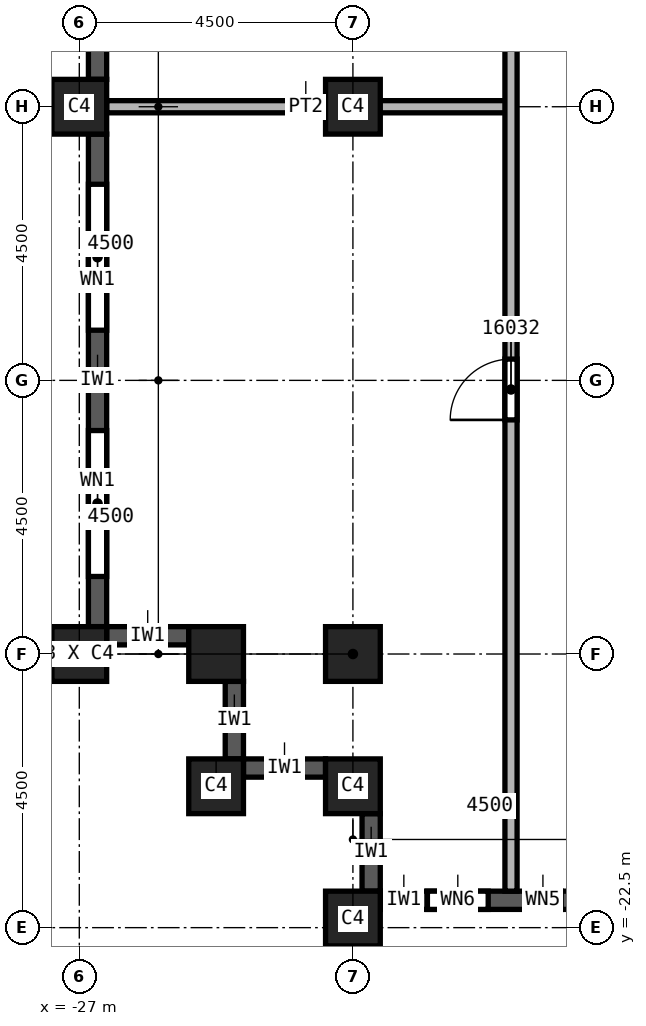
"""IFC4 building model, lengths in metres.
Left out: names, types, materials, properties, quantities, classifications, styles, units other than length and angle.
Written with IfcOpenShell. Run it as: python <this file> out.ifc"""

import sys

from ifc_helpers import new_model, si_unit, direction, frame, frame_2d, origin, origin_2d, place, context, subcontext, project, spatial, rectangle, extrude, element, fill, save


model = new_model("IFC4")
c1 = context("Model", 3, precision=1e-05, world=origin(), true_north=direction((0.0, 1.0)))
c2 = subcontext(c1, "Body", "Model", "MODEL_VIEW")
j1 = project(units=[si_unit("LENGTHUNIT", "METRE"), si_unit("PLANEANGLEUNIT", "RADIAN")], contexts=[c1])
p1 = place(None, origin())
s1 = spatial("IfcSite", under=j1, at=p1, CompositionType="ELEMENT")
p2 = place(p1, origin())
s2 = spatial("IfcBuilding", under=s1, at=p2, CompositionType="ELEMENT")
p3 = place(p2, frame((0.0, 0.0, 246.0)))
s3 = spatial("IfcBuildingStorey", under=s2, at=p3, CompositionType="ELEMENT", Elevation=246.0)
for number, where, z_axis, x_axis in (
    (1, (-22.5, -9.0, 0.0), (0.0, 0.0, 1.0), (1.0, 0.0, 0.0)),
    (2, (-22.5, -18.0, 0.0), (0.0, 0.0, 1.0), (1.0, 0.0, 0.0)),
    (3, (-22.5, -22.35, 0.0), (0.0, 0.0, 1.0), (1.0, 0.0, 0.0)),
    (4, (-27.0, -9.0, 0.0), (0.0, 0.0, 1.0), (0.0, 1.0, 0.0)),
    (5, (-27.0, -18.0, 0.0), (0.0, 0.0, 1.0), (0.0, 1.0, 0.0)),
    (6, (-22.5, -20.175, 0.0), (0.0, 0.0, 1.0), (1.0, 0.0, 0.0)),
    (7, (-24.75, -20.175, 0.0), (0.0, 0.0, 1.0), (1.0, 0.0, 0.0)),
    (8, (-24.75, -18.0, 0.0), (0.0, 0.0, 1.0), (1.0, 0.0, 0.0)),
):
    element("IfcColumn", number, at=place(p3, frame(where, z_axis=z_axis, x_axis=x_axis)), inside=s3, PredefinedType="COLUMN", context=c2, shape_type="SweptSolid", body=[
        extrude(rectangle(XDim=0.9, YDim=0.9, at=origin_2d()), origin(), (0.0, 0.0, 1.0), 3.72),
    ])
p4 = place(p3, frame((-26.7, -0.45, 0.0), z_axis=(0.0, 0.0, 1.0), x_axis=(0.0, -1.0, 0.0)))
e9 = element("IfcWall", 9, at=p4, inside=s3, PredefinedType="SOLIDWALL", context=c2, shape_type="SweptSolid", body=[
    extrude(rectangle(XDim=8.1, YDim=0.3, at=frame_2d((4.05, 0.0))), origin(), (0.0, 0.0, 1.0), 3.12),
])
p5 = place(p4, frame((0.825, 0.0, 0.8)))
e10 = element("IfcOpeningElement", 10, at=p5, cuts=e9, PredefinedType="OPENING", context=c2, shape_type="SweptSolid", body=[
    extrude(rectangle(XDim=2.4, YDim=1.95, at=frame_2d((1.2, 0.975))), frame((0.0, 0.15, 0.0), z_axis=(0.0, -1.0, 0.0), x_axis=(1.0, 0.0, 0.0)), (0.0, 0.0, 1.0), 0.3),
])
p6 = place(p4, frame((4.875, 0.0, 0.8)))
e11 = element("IfcOpeningElement", 11, at=p6, cuts=e9, PredefinedType="OPENING", context=c2, shape_type="SweptSolid", body=[
    extrude(rectangle(XDim=2.4, YDim=1.95, at=frame_2d((1.2, 0.975))), frame((0.0, 0.15, 0.0), z_axis=(0.0, -1.0, 0.0), x_axis=(1.0, 0.0, 0.0)), (0.0, 0.0, 1.0), 0.3),
])
p7 = place(p3, frame((-26.7, -9.45, 0.0), z_axis=(0.0, 0.0, 1.0), x_axis=(0.0, -1.0, 0.0)))
e12 = element("IfcWall", 12, at=p7, inside=s3, PredefinedType="SOLIDWALL", context=c2, shape_type="SweptSolid", body=[
    extrude(rectangle(XDim=8.1, YDim=0.3, at=frame_2d((4.05, 0.0))), origin(), (0.0, 0.0, 1.0), 3.12),
])
p8 = place(p7, frame((0.825, 0.0, 0.8)))
e13 = element("IfcOpeningElement", 13, at=p8, cuts=e12, PredefinedType="OPENING", context=c2, shape_type="SweptSolid", body=[
    extrude(rectangle(XDim=2.4, YDim=1.95, at=frame_2d((1.2, 0.975))), frame((0.0, 0.15, 0.0), z_axis=(0.0, -1.0, 0.0), x_axis=(1.0, 0.0, 0.0)), (0.0, 0.0, 1.0), 0.3),
])
p9 = place(p7, frame((4.875, 0.0, 0.8)))
e14 = element("IfcOpeningElement", 14, at=p9, cuts=e12, PredefinedType="OPENING", context=c2, shape_type="SweptSolid", body=[
    extrude(rectangle(XDim=2.4, YDim=1.95, at=frame_2d((1.2, 0.975))), frame((0.0, 0.15, 0.0), z_axis=(0.0, -1.0, 0.0), x_axis=(1.0, 0.0, 0.0)), (0.0, 0.0, 1.0), 0.3),
])
p10 = place(p3, frame((-26.55, -17.7, 0.0), z_axis=(0.0, 0.0, 1.0), x_axis=(1.0, 0.0, 0.0)))
e15 = element("IfcWall", 15, at=p10, inside=s3, PredefinedType="SOLIDWALL", context=c2, shape_type="SweptSolid", body=[
    extrude(rectangle(XDim=1.35, YDim=0.3, at=frame_2d((0.675, 0.0))), origin(), (0.0, 0.0, 1.0), 3.12),
])
p11 = place(p3, frame((-24.45, -18.45, 0.0), z_axis=(0.0, 0.0, 1.0), x_axis=(0.0, -1.0, 0.0)))
e16 = element("IfcWall", 16, at=p11, inside=s3, PredefinedType="SOLIDWALL", context=c2, shape_type="SweptSolid", body=[
    extrude(rectangle(XDim=1.275, YDim=0.3, at=frame_2d((0.638, 0.0))), origin(), (0.0, 0.0, 1.0), 3.12),
])
p12 = place(p3, frame((-24.3, -19.875, 0.0), z_axis=(0.0, 0.0, 1.0), x_axis=(1.0, 0.0, 0.0)))
e17 = element("IfcWall", 17, at=p12, inside=s3, PredefinedType="SOLIDWALL", context=c2, shape_type="SweptSolid", body=[
    extrude(rectangle(XDim=1.35, YDim=0.3, at=frame_2d((0.675, 0.0))), origin(), (0.0, 0.0, 1.0), 3.12),
])
p13 = place(p3, frame((-22.2, -20.625, 0.0), z_axis=(0.0, 0.0, 1.0), x_axis=(0.0, -1.0, 0.0)))
e18 = element("IfcWall", 18, at=p13, inside=s3, PredefinedType="SOLIDWALL", context=c2, shape_type="SweptSolid", body=[
    extrude(rectangle(XDim=1.275, YDim=0.3, at=frame_2d((0.637, 0.0))), origin(), (0.0, 0.0, 1.0), 3.12),
])
p14 = place(p3, frame((-22.05, -22.05, 0.0), z_axis=(0.0, 0.0, 1.0), x_axis=(1.0, 0.0, 0.0)))
e19 = element("IfcWall", 19, at=p14, inside=s3, PredefinedType="SOLIDWALL", context=c2, shape_type="SweptSolid", body=[
    extrude(rectangle(XDim=3.6, YDim=0.3, at=frame_2d((1.8, 0.0))), origin(), (0.0, 0.0, 1.0), 3.12),
])
p15 = place(p14, frame((0.775, 0.0, 0.8)))
e20 = element("IfcOpeningElement", 20, at=p15, cuts=e19, PredefinedType="OPENING", context=c2, shape_type="SweptSolid", body=[
    extrude(rectangle(XDim=1.0, YDim=1.95, at=frame_2d((0.5, 0.975))), frame((0.0, 0.15, 0.0), z_axis=(0.0, -1.0, 0.0), x_axis=(1.0, 0.0, 0.0)), (0.0, 0.0, 1.0), 0.3),
])
p16 = place(p14, frame((2.375, 0.0, 0.8)))
e21 = element("IfcOpeningElement", 21, at=p16, cuts=e19, PredefinedType="OPENING", context=c2, shape_type="SweptSolid", body=[
    extrude(rectangle(XDim=0.6, YDim=1.95, at=frame_2d((0.3, 0.975))), frame((0.0, 0.15, 0.0), z_axis=(0.0, -1.0, 0.0), x_axis=(1.0, 0.0, 0.0)), (0.0, 0.0, 1.0), 0.3),
])
p17 = place(p3, frame((-26.55, -9.0, 0.0), z_axis=(0.0, 0.0, 1.0), x_axis=(1.0, 0.0, 0.0)))
e22 = element("IfcWall", 22, at=p17, inside=s3, PredefinedType="PARTITIONING", context=c2, shape_type="SweptSolid", body=[
    extrude(rectangle(XDim=6.65, YDim=0.2, at=frame_2d((3.325, 0.0))), origin(), (0.0, 0.0, 1.0), 3.72),
])
p18 = place(p3, frame((-19.9, -21.9, 0.0), z_axis=(0.0, 0.0, 1.0), x_axis=(0.0, 1.0, 0.0)))
e23 = element("IfcWall", 23, at=p18, inside=s3, PredefinedType="PARTITIONING", context=c2, shape_type="SweptSolid", body=[
    extrude(rectangle(XDim=35.5, YDim=0.2, at=frame_2d((17.75, 0.0))), origin(), (0.0, 0.0, 1.0), 3.72),
])
p19 = place(p18, frame((22.95, 0.0, 0.0)))
e24 = element("IfcOpeningElement", 24, at=p19, cuts=e23, PredefinedType="OPENING", context=c2, shape_type="SweptSolid", body=[
    extrude(rectangle(XDim=1.0, YDim=2.1, at=frame_2d((0.5, 1.05))), frame((0.0, 0.1, 0.0), z_axis=(0.0, -1.0, 0.0), x_axis=(1.0, 0.0, 0.0)), (0.0, 0.0, 1.0), 0.2),
])
p20 = place(p18, frame((28.8, 0.0, 0.0)))
e25 = element("IfcOpeningElement", 25, at=p20, cuts=e23, PredefinedType="OPENING", context=c2, shape_type="SweptSolid", body=[
    extrude(rectangle(XDim=1.0, YDim=2.1, at=frame_2d((0.5, 1.05))), frame((0.0, 0.1, 0.0), z_axis=(0.0, -1.0, 0.0), x_axis=(1.0, 0.0, 0.0)), (0.0, 0.0, 1.0), 0.2),
])
p21 = place(p18, frame((7.75, 0.0, 0.0)))
e26 = element("IfcOpeningElement", 26, at=p21, cuts=e23, PredefinedType="OPENING", context=c2, shape_type="SweptSolid", body=[
    extrude(rectangle(XDim=1.0, YDim=2.1, at=frame_2d((0.5, 1.05))), frame((0.0, 0.1, 0.0), z_axis=(0.0, -1.0, 0.0), x_axis=(1.0, 0.0, 0.0)), (0.0, 0.0, 1.0), 0.2),
])
p22 = place(p18, frame((17.85, 0.0, 0.0)))
e27 = element("IfcOpeningElement", 27, at=p22, cuts=e23, PredefinedType="OPENING", context=c2, shape_type="SweptSolid", body=[
    extrude(rectangle(XDim=1.0, YDim=2.1, at=frame_2d((0.5, 1.05))), frame((0.0, 0.1, 0.0), z_axis=(0.0, -1.0, 0.0), x_axis=(1.0, 0.0, 0.0)), (0.0, 0.0, 1.0), 0.2),
])
p23 = place(p8, origin())
e28 = element("IfcWindow", 28, at=p23, inside=s3, PartitioningType="SINGLE_PANEL", PredefinedType="WINDOW", context=c2, shape_type="SweptSolid", body=[
    extrude(rectangle(XDim=2.4, YDim=1.95, at=frame_2d((1.2, 0.975))), frame((0.0, 0.03, 0.0), z_axis=(0.0, -1.0, 0.0), x_axis=(1.0, 0.0, 0.0)), (0.0, 0.0, 1.0), 0.06),
])
fill(e13, e28)
p24 = place(p9, origin())
e29 = element("IfcWindow", 29, at=p24, inside=s3, PartitioningType="SINGLE_PANEL", PredefinedType="WINDOW", context=c2, shape_type="SweptSolid", body=[
    extrude(rectangle(XDim=2.4, YDim=1.95, at=frame_2d((1.2, 0.975))), frame((0.0, 0.03, 0.0), z_axis=(0.0, -1.0, 0.0), x_axis=(1.0, 0.0, 0.0)), (0.0, 0.0, 1.0), 0.06),
])
fill(e14, e29)
p25 = place(p21, origin())
e30 = element("IfcDoor", 30, at=p25, inside=s3, OperationType="SINGLE_SWING_LEFT", PredefinedType="DOOR", context=c2, shape_type="SweptSolid", body=[
    extrude(rectangle(XDim=1.0, YDim=2.1, at=frame_2d((0.5, 1.05))), frame((0.0, 0.025, 0.0), z_axis=(0.0, -1.0, 0.0), x_axis=(1.0, 0.0, 0.0)), (0.0, 0.0, 1.0), 0.05),
])
fill(e26, e30)
p26 = place(p15, origin())
e31 = element("IfcWindow", 31, at=p26, inside=s3, PartitioningType="SINGLE_PANEL", PredefinedType="WINDOW", context=c2, shape_type="SweptSolid", body=[
    extrude(rectangle(XDim=1.0, YDim=1.95, at=frame_2d((0.5, 0.975))), frame((0.0, 0.03, 0.0), z_axis=(0.0, -1.0, 0.0), x_axis=(1.0, 0.0, 0.0)), (0.0, 0.0, 1.0), 0.06),
])
fill(e20, e31)
p27 = place(p16, origin())
e32 = element("IfcWindow", 32, at=p27, inside=s3, PartitioningType="SINGLE_PANEL", PredefinedType="WINDOW", context=c2, shape_type="SweptSolid", body=[
    extrude(rectangle(XDim=0.6, YDim=1.95, at=frame_2d((0.3, 0.975))), frame((0.0, 0.03, 0.0), z_axis=(0.0, -1.0, 0.0), x_axis=(1.0, 0.0, 0.0)), (0.0, 0.0, 1.0), 0.06),
])
fill(e21, e32)
save(model, sys.argv[1])
